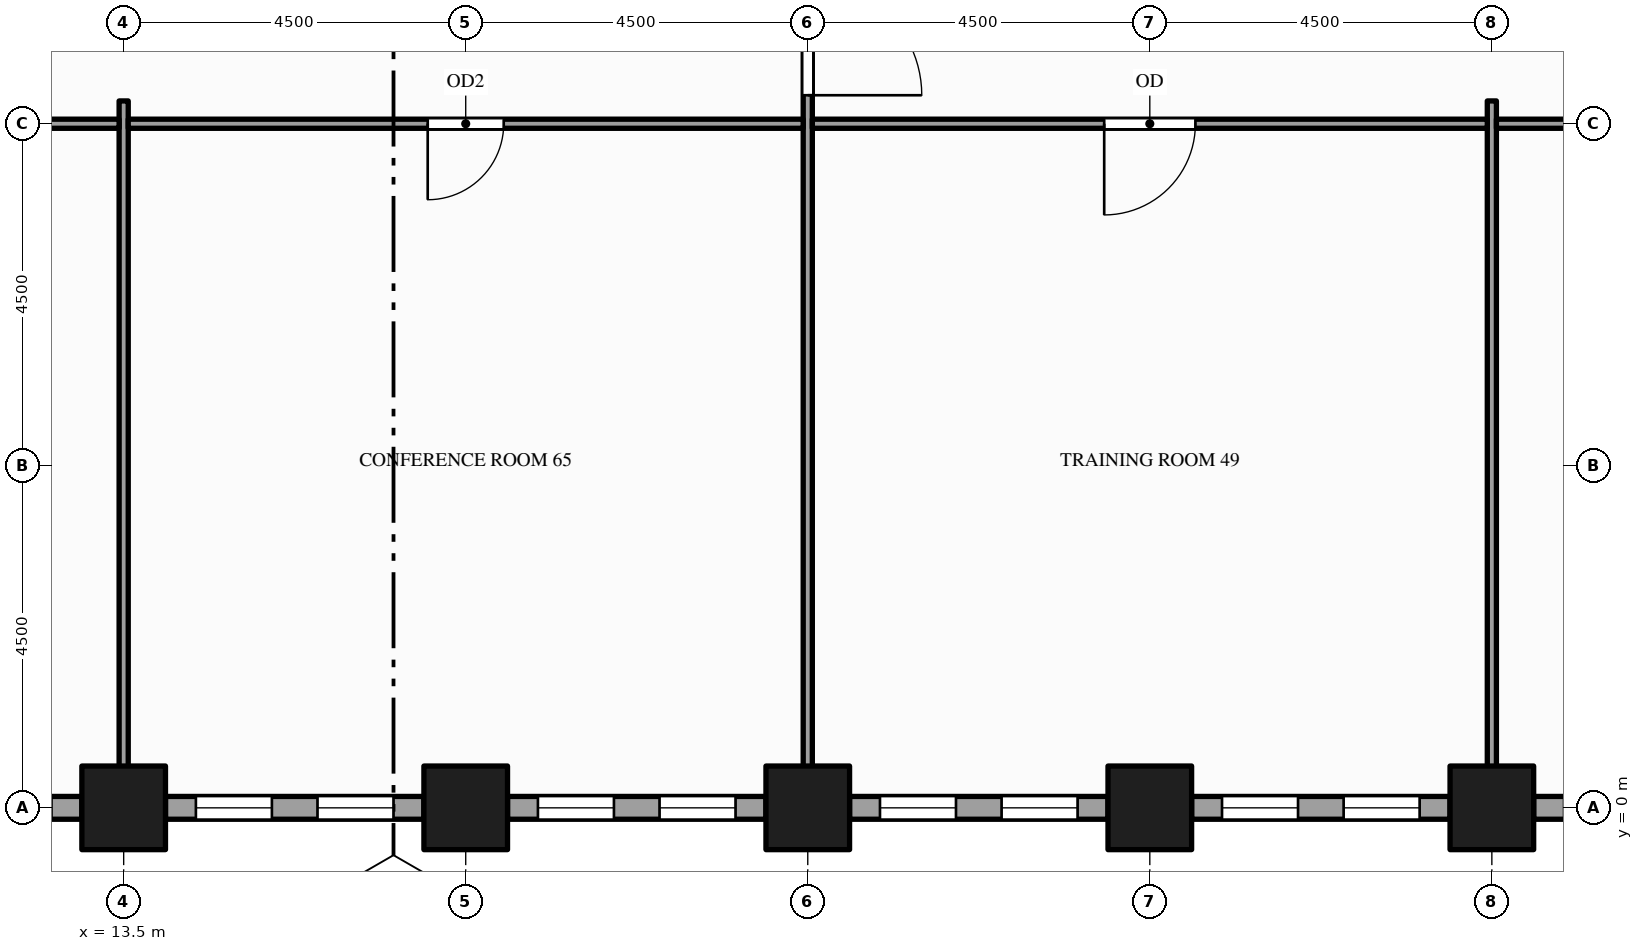
"""IFC4 building model, lengths in metres.
Left out: names, types, materials, properties, quantities, classifications, styles, units other than length and angle.
Written with IfcOpenShell. Run it as: python <this file> out.ifc"""

import sys

from ifc_helpers import new_model, si_unit, direction, frame, frame_2d, origin, origin_2d, place, context, subcontext, project, spatial, rectangle, hollow_rectangle, extrude, element, fill, save


model = new_model("IFC4")
c1 = context("Model", 3, precision=1e-05, world=origin(), true_north=direction((0.0, 1.0)))
c2 = subcontext(c1, "Body", "Model", "MODEL_VIEW")
j1 = project(units=[si_unit("LENGTHUNIT", "METRE"), si_unit("PLANEANGLEUNIT", "RADIAN")], contexts=[c1])
p1 = place(None, origin())
s1 = spatial("IfcSite", under=j1, at=p1, CompositionType="ELEMENT")
p2 = place(p1, origin())
s2 = spatial("IfcBuilding", under=s1, at=p2, CompositionType="ELEMENT")
p3 = place(p2, frame((0.0, 0.0, 24.0)))
s3 = spatial("IfcBuildingStorey", under=s2, at=p3, CompositionType="ELEMENT", Elevation=24.0)
for number, where, z_axis, x_axis in (
    (1, (13.5, 0.0, -0.25), (0.0, 0.0, 1.0), (1.0, 0.0, 0.0)),
    (2, (18.0, 0.0, -0.25), (0.0, 0.0, 1.0), (1.0, 0.0, 0.0)),
):
    element("IfcColumn", number, at=place(p3, frame(where, z_axis=z_axis, x_axis=x_axis)), inside=s3, PredefinedType="COLUMN", context=c2, shape_type="SweptSolid", body=[
        extrude(hollow_rectangle(XDim=1.1, YDim=1.1, WallThickness=0.06, at=origin_2d()), origin(), (0.0, 0.0, 1.0), 5.1),
    ])
for number, where, z_axis, x_axis in (
    (3, (22.5, 0.0, -0.25), (0.0, 0.0, 1.0), (1.0, 0.0, 0.0)),
    (4, (27.0, 0.0, -0.25), (0.0, 0.0, 1.0), (1.0, 0.0, 0.0)),
    (5, (31.5, 0.0, -0.25), (0.0, 0.0, 1.0), (1.0, 0.0, 0.0)),
):
    element("IfcColumn", number, at=place(p3, frame(where, z_axis=z_axis, x_axis=x_axis)), inside=s3, PredefinedType="COLUMN", context=c2, shape_type="SweptSolid", body=[
        extrude(hollow_rectangle(XDim=1.1, YDim=1.1, WallThickness=0.06, at=origin_2d()), origin(), (0.0, 0.0, 1.0), 4.95),
    ])
p4 = place(p3, frame((9.55, 0.0, 0.0), z_axis=(0.0, 0.0, 1.0), x_axis=(1.0, 0.0, 0.0)))
e6 = element("IfcWall", 6, at=p4, inside=s3, PredefinedType="STANDARD", context=c2, shape_type="SweptSolid", body=[
    extrude(rectangle(XDim=3.4, YDim=0.3, at=frame_2d((1.7, 0.0))), origin(), (0.0, 0.0, 1.0), 4.136),
])
p5 = place(p4, frame((0.4, 0.0, 0.9)))
e7 = element("IfcOpeningElement", 7, at=p5, cuts=e6, PredefinedType="OPENING", context=c2, shape_type="SweptSolid", body=[
    extrude(rectangle(XDim=1.0, YDim=3.0, at=frame_2d((0.5, 1.5))), frame((0.0, 0.16, 0.0), z_axis=(0.0, -1.0, 0.0), x_axis=(1.0, 0.0, 0.0)), (0.0, 0.0, 1.0), 0.32),
])
p6 = place(p4, frame((2.0, 0.0, 0.9)))
e8 = element("IfcOpeningElement", 8, at=p6, cuts=e6, PredefinedType="OPENING", context=c2, shape_type="SweptSolid", body=[
    extrude(rectangle(XDim=1.0, YDim=3.0, at=frame_2d((0.5, 1.5))), frame((0.0, 0.16, 0.0), z_axis=(0.0, -1.0, 0.0), x_axis=(1.0, 0.0, 0.0)), (0.0, 0.0, 1.0), 0.32),
])
p7 = place(p3, frame((14.05, 0.0, 0.0), z_axis=(0.0, 0.0, 1.0), x_axis=(1.0, 0.0, 0.0)))
e9 = element("IfcWall", 9, at=p7, inside=s3, PredefinedType="STANDARD", context=c2, shape_type="SweptSolid", body=[
    extrude(rectangle(XDim=3.4, YDim=0.3, at=frame_2d((1.7, 0.0))), origin(), (0.0, 0.0, 1.0), 4.136),
])
p8 = place(p7, frame((0.4, 0.0, 0.9)))
e10 = element("IfcOpeningElement", 10, at=p8, cuts=e9, PredefinedType="OPENING", context=c2, shape_type="SweptSolid", body=[
    extrude(rectangle(XDim=1.0, YDim=3.0, at=frame_2d((0.5, 1.5))), frame((0.0, 0.16, 0.0), z_axis=(0.0, -1.0, 0.0), x_axis=(1.0, 0.0, 0.0)), (0.0, 0.0, 1.0), 0.32),
])
p9 = place(p7, frame((2.0, 0.0, 0.9)))
e11 = element("IfcOpeningElement", 11, at=p9, cuts=e9, PredefinedType="OPENING", context=c2, shape_type="SweptSolid", body=[
    extrude(rectangle(XDim=1.0, YDim=3.0, at=frame_2d((0.5, 1.5))), frame((0.0, 0.16, 0.0), z_axis=(0.0, -1.0, 0.0), x_axis=(1.0, 0.0, 0.0)), (0.0, 0.0, 1.0), 0.32),
])
p10 = place(p3, frame((18.55, 0.0, 0.0), z_axis=(0.0, 0.0, 1.0), x_axis=(1.0, 0.0, 0.0)))
e12 = element("IfcWall", 12, at=p10, inside=s3, PredefinedType="STANDARD", context=c2, shape_type="SweptSolid", body=[
    extrude(rectangle(XDim=3.4, YDim=0.3, at=frame_2d((1.7, 0.0))), origin(), (0.0, 0.0, 1.0), 4.136),
])
p11 = place(p10, frame((0.4, 0.0, 0.9)))
e13 = element("IfcOpeningElement", 13, at=p11, cuts=e12, PredefinedType="OPENING", context=c2, shape_type="SweptSolid", body=[
    extrude(rectangle(XDim=1.0, YDim=3.0, at=frame_2d((0.5, 1.5))), frame((0.0, 0.16, 0.0), z_axis=(0.0, -1.0, 0.0), x_axis=(1.0, 0.0, 0.0)), (0.0, 0.0, 1.0), 0.32),
])
p12 = place(p10, frame((2.0, 0.0, 0.9)))
e14 = element("IfcOpeningElement", 14, at=p12, cuts=e12, PredefinedType="OPENING", context=c2, shape_type="SweptSolid", body=[
    extrude(rectangle(XDim=1.0, YDim=3.0, at=frame_2d((0.5, 1.5))), frame((0.0, 0.16, 0.0), z_axis=(0.0, -1.0, 0.0), x_axis=(1.0, 0.0, 0.0)), (0.0, 0.0, 1.0), 0.32),
])
p13 = place(p3, frame((23.05, 0.0, 0.0), z_axis=(0.0, 0.0, 1.0), x_axis=(1.0, 0.0, 0.0)))
e15 = element("IfcWall", 15, at=p13, inside=s3, PredefinedType="STANDARD", context=c2, shape_type="SweptSolid", body=[
    extrude(rectangle(XDim=3.4, YDim=0.3, at=frame_2d((1.7, 0.0))), origin(), (0.0, 0.0, 1.0), 3.994),
])
p14 = place(p13, frame((0.4, 0.0, 0.9)))
e16 = element("IfcOpeningElement", 16, at=p14, cuts=e15, PredefinedType="OPENING", context=c2, shape_type="SweptSolid", body=[
    extrude(rectangle(XDim=1.0, YDim=2.75, at=frame_2d((0.5, 1.375))), frame((0.0, 0.16, 0.0), z_axis=(0.0, -1.0, 0.0), x_axis=(1.0, 0.0, 0.0)), (0.0, 0.0, 1.0), 0.32),
])
p15 = place(p13, frame((2.0, 0.0, 0.9)))
e17 = element("IfcOpeningElement", 17, at=p15, cuts=e15, PredefinedType="OPENING", context=c2, shape_type="SweptSolid", body=[
    extrude(rectangle(XDim=1.0, YDim=2.75, at=frame_2d((0.5, 1.375))), frame((0.0, 0.16, 0.0), z_axis=(0.0, -1.0, 0.0), x_axis=(1.0, 0.0, 0.0)), (0.0, 0.0, 1.0), 0.32),
])
p16 = place(p3, frame((27.55, 0.0, 0.0), z_axis=(0.0, 0.0, 1.0), x_axis=(1.0, 0.0, 0.0)))
e18 = element("IfcWall", 18, at=p16, inside=s3, PredefinedType="STANDARD", context=c2, shape_type="SweptSolid", body=[
    extrude(rectangle(XDim=3.4, YDim=0.3, at=frame_2d((1.7, 0.0))), origin(), (0.0, 0.0, 1.0), 3.994),
])
p17 = place(p16, frame((0.4, 0.0, 0.9)))
e19 = element("IfcOpeningElement", 19, at=p17, cuts=e18, PredefinedType="OPENING", context=c2, shape_type="SweptSolid", body=[
    extrude(rectangle(XDim=1.0, YDim=2.75, at=frame_2d((0.5, 1.375))), frame((0.0, 0.16, 0.0), z_axis=(0.0, -1.0, 0.0), x_axis=(1.0, 0.0, 0.0)), (0.0, 0.0, 1.0), 0.32),
])
p18 = place(p16, frame((2.0, 0.0, 0.9)))
e20 = element("IfcOpeningElement", 20, at=p18, cuts=e18, PredefinedType="OPENING", context=c2, shape_type="SweptSolid", body=[
    extrude(rectangle(XDim=1.0, YDim=2.75, at=frame_2d((0.5, 1.375))), frame((0.0, 0.16, 0.0), z_axis=(0.0, -1.0, 0.0), x_axis=(1.0, 0.0, 0.0)), (0.0, 0.0, 1.0), 0.32),
])
p19 = place(p3, frame((32.05, 0.0, 0.0), z_axis=(0.0, 0.0, 1.0), x_axis=(1.0, 0.0, 0.0)))
e21 = element("IfcWall", 21, at=p19, inside=s3, PredefinedType="STANDARD", context=c2, shape_type="SweptSolid", body=[
    extrude(rectangle(XDim=3.4, YDim=0.3, at=frame_2d((1.7, 0.0))), origin(), (0.0, 0.0, 1.0), 3.994),
])
p20 = place(p19, frame((0.4, 0.0, 0.9)))
e22 = element("IfcOpeningElement", 22, at=p20, cuts=e21, PredefinedType="OPENING", context=c2, shape_type="SweptSolid", body=[
    extrude(rectangle(XDim=1.0, YDim=2.75, at=frame_2d((0.5, 1.375))), frame((0.0, 0.16, 0.0), z_axis=(0.0, -1.0, 0.0), x_axis=(1.0, 0.0, 0.0)), (0.0, 0.0, 1.0), 0.32),
])
p21 = place(p19, frame((2.0, 0.0, 0.9)))
e23 = element("IfcOpeningElement", 23, at=p21, cuts=e21, PredefinedType="OPENING", context=c2, shape_type="SweptSolid", body=[
    extrude(rectangle(XDim=1.0, YDim=2.75, at=frame_2d((0.5, 1.375))), frame((0.0, 0.16, 0.0), z_axis=(0.0, -1.0, 0.0), x_axis=(1.0, 0.0, 0.0)), (0.0, 0.0, 1.0), 0.32),
])
p22 = place(p3, frame((13.5, 0.15, 0.0), z_axis=(0.0, 0.0, 1.0), x_axis=(0.0, 1.0, 0.0)))
e24 = element("IfcWall", 24, at=p22, inside=s3, PredefinedType="PARTITIONING", context=c2, shape_type="SweptSolid", body=[
    extrude(rectangle(XDim=9.15, YDim=0.12, at=frame_2d((4.575, 0.0))), origin(), (0.0, 0.0, 1.0), 3.938),
])
p23 = place(p3, frame((22.5, 0.15, 0.0), z_axis=(0.0, 0.0, 1.0), x_axis=(0.0, 1.0, 0.0)))
e25 = element("IfcWall", 25, at=p23, inside=s3, PredefinedType="PARTITIONING", context=c2, shape_type="SweptSolid", body=[
    extrude(rectangle(XDim=35.95, YDim=0.12, at=frame_2d((17.975, 0.0))), origin(), (0.0, 0.0, 1.0), 3.3),
])
p24 = place(p23, frame((9.225, 0.0, 0.0)))
e26 = element("IfcOpeningElement", 26, at=p24, cuts=e25, PredefinedType="OPENING", context=c2, shape_type="SweptSolid", body=[
    extrude(rectangle(XDim=1.5, YDim=2.1, at=frame_2d((0.75, 1.05))), frame((0.0, 0.07, 0.0), z_axis=(0.0, -1.0, 0.0), x_axis=(1.0, 0.0, 0.0)), (0.0, 0.0, 1.0), 0.14),
])
p25 = place(p23, frame((32.7, 0.0, 0.0)))
e27 = element("IfcOpeningElement", 27, at=p25, cuts=e25, PredefinedType="OPENING", context=c2, shape_type="SweptSolid", body=[
    extrude(rectangle(XDim=1.8, YDim=2.1, at=frame_2d((0.9, 1.05))), frame((0.0, 0.07, 0.0), z_axis=(0.0, -1.0, 0.0), x_axis=(1.0, 0.0, 0.0)), (0.0, 0.0, 1.0), 0.14),
])
p26 = place(p3, frame((31.5, 0.15, 0.0), z_axis=(0.0, 0.0, 1.0), x_axis=(0.0, 1.0, 0.0)))
e28 = element("IfcWall", 28, at=p26, inside=s3, PredefinedType="PARTITIONING", context=c2, shape_type="SweptSolid", body=[
    extrude(rectangle(XDim=9.15, YDim=0.12, at=frame_2d((4.575, 0.0))), origin(), (0.0, 0.0, 1.0), 3.3),
])
p27 = place(p3, frame((9.06, 9.0, 0.0), z_axis=(0.0, 0.0, 1.0), x_axis=(1.0, 0.0, 0.0)))
e29 = element("IfcWall", 29, at=p27, inside=s3, PredefinedType="PARTITIONING", context=c2, shape_type="SweptSolid", body=[
    extrude(rectangle(XDim=4.38, YDim=0.12, at=frame_2d((2.19, 0.0))), origin(), (0.0, 0.0, 1.0), 3.938),
])
p28 = place(p27, frame((1.69, 0.0, 0.0)))
e30 = element("IfcOpeningElement", 30, at=p28, cuts=e29, PredefinedType="OPENING", context=c2, shape_type="SweptSolid", body=[
    extrude(rectangle(XDim=1.0, YDim=2.1, at=frame_2d((0.5, 1.05))), frame((0.0, 0.07, 0.0), z_axis=(0.0, -1.0, 0.0), x_axis=(1.0, 0.0, 0.0)), (0.0, 0.0, 1.0), 0.14),
])
p29 = place(p3, frame((13.56, 9.0, 0.0), z_axis=(0.0, 0.0, 1.0), x_axis=(1.0, 0.0, 0.0)))
e31 = element("IfcWall", 31, at=p29, inside=s3, PredefinedType="PARTITIONING", context=c2, shape_type="SweptSolid", body=[
    extrude(rectangle(XDim=8.88, YDim=0.12, at=frame_2d((4.44, 0.0))), origin(), (0.0, 0.0, 1.0), 3.938),
])
p30 = place(p29, frame((3.94, 0.0, 0.0)))
e32 = element("IfcOpeningElement", 32, at=p30, cuts=e31, PredefinedType="OPENING", context=c2, shape_type="SweptSolid", body=[
    extrude(rectangle(XDim=1.0, YDim=2.1, at=frame_2d((0.5, 1.05))), frame((0.0, 0.07, 0.0), z_axis=(0.0, -1.0, 0.0), x_axis=(1.0, 0.0, 0.0)), (0.0, 0.0, 1.0), 0.14),
])
p31 = place(p3, frame((22.56, 9.0, 0.0), z_axis=(0.0, 0.0, 1.0), x_axis=(1.0, 0.0, 0.0)))
e33 = element("IfcWall", 33, at=p31, inside=s3, PredefinedType="PARTITIONING", context=c2, shape_type="SweptSolid", body=[
    extrude(rectangle(XDim=8.88, YDim=0.12, at=frame_2d((4.44, 0.0))), origin(), (0.0, 0.0, 1.0), 3.788),
])
p32 = place(p31, frame((3.84, 0.0, 0.0)))
e34 = element("IfcOpeningElement", 34, at=p32, cuts=e33, PredefinedType="OPENING", context=c2, shape_type="SweptSolid", body=[
    extrude(rectangle(XDim=1.2, YDim=2.1, at=frame_2d((0.6, 1.05))), frame((0.0, 0.07, 0.0), z_axis=(0.0, -1.0, 0.0), x_axis=(1.0, 0.0, 0.0)), (0.0, 0.0, 1.0), 0.14),
])
p33 = place(p3, frame((31.56, 9.0, 0.0), z_axis=(0.0, 0.0, 1.0), x_axis=(1.0, 0.0, 0.0)))
e35 = element("IfcWall", 35, at=p33, inside=s3, PredefinedType="PARTITIONING", context=c2, shape_type="SweptSolid", body=[
    extrude(rectangle(XDim=13.38, YDim=0.12, at=frame_2d((6.69, 0.0))), origin(), (0.0, 0.0, 1.0), 3.938),
])
p34 = place(p33, frame((6.09, 0.0, 0.0)))
e36 = element("IfcOpeningElement", 36, at=p34, cuts=e35, PredefinedType="OPENING", context=c2, shape_type="SweptSolid", body=[
    extrude(rectangle(XDim=1.2, YDim=2.1, at=frame_2d((0.6, 1.05))), frame((0.0, 0.07, 0.0), z_axis=(0.0, -1.0, 0.0), x_axis=(1.0, 0.0, 0.0)), (0.0, 0.0, 1.0), 0.14),
])
p35 = place(p8, origin())
e37 = element("IfcWindow", 37, at=p35, inside=s3, PartitioningType="SINGLE_PANEL", PredefinedType="WINDOW", context=c2, shape_type="SweptSolid", body=[
    extrude(rectangle(XDim=1.0, YDim=3.0, at=frame_2d((0.5, 1.5))), frame((0.0, 0.03, 0.0), z_axis=(0.0, -1.0, 0.0), x_axis=(1.0, 0.0, 0.0)), (0.0, 0.0, 1.0), 0.06),
])
fill(e10, e37)
p36 = place(p9, origin())
e38 = element("IfcWindow", 38, at=p36, inside=s3, PartitioningType="SINGLE_PANEL", PredefinedType="WINDOW", context=c2, shape_type="SweptSolid", body=[
    extrude(rectangle(XDim=1.0, YDim=3.0, at=frame_2d((0.5, 1.5))), frame((0.0, 0.03, 0.0), z_axis=(0.0, -1.0, 0.0), x_axis=(1.0, 0.0, 0.0)), (0.0, 0.0, 1.0), 0.06),
])
fill(e11, e38)
p37 = place(p11, origin())
e39 = element("IfcWindow", 39, at=p37, inside=s3, PartitioningType="SINGLE_PANEL", PredefinedType="WINDOW", context=c2, shape_type="SweptSolid", body=[
    extrude(rectangle(XDim=1.0, YDim=3.0, at=frame_2d((0.5, 1.5))), frame((0.0, 0.03, 0.0), z_axis=(0.0, -1.0, 0.0), x_axis=(1.0, 0.0, 0.0)), (0.0, 0.0, 1.0), 0.06),
])
fill(e13, e39)
p38 = place(p12, origin())
e40 = element("IfcWindow", 40, at=p38, inside=s3, PartitioningType="SINGLE_PANEL", PredefinedType="WINDOW", context=c2, shape_type="SweptSolid", body=[
    extrude(rectangle(XDim=1.0, YDim=3.0, at=frame_2d((0.5, 1.5))), frame((0.0, 0.03, 0.0), z_axis=(0.0, -1.0, 0.0), x_axis=(1.0, 0.0, 0.0)), (0.0, 0.0, 1.0), 0.06),
])
fill(e14, e40)
p39 = place(p14, origin())
e41 = element("IfcWindow", 41, at=p39, inside=s3, PartitioningType="SINGLE_PANEL", PredefinedType="WINDOW", context=c2, shape_type="SweptSolid", body=[
    extrude(rectangle(XDim=1.0, YDim=2.75, at=frame_2d((0.5, 1.375))), frame((0.0, 0.03, 0.0), z_axis=(0.0, -1.0, 0.0), x_axis=(1.0, 0.0, 0.0)), (0.0, 0.0, 1.0), 0.06),
])
fill(e16, e41)
p40 = place(p15, origin())
e42 = element("IfcWindow", 42, at=p40, inside=s3, PartitioningType="SINGLE_PANEL", PredefinedType="WINDOW", context=c2, shape_type="SweptSolid", body=[
    extrude(rectangle(XDim=1.0, YDim=2.75, at=frame_2d((0.5, 1.375))), frame((0.0, 0.03, 0.0), z_axis=(0.0, -1.0, 0.0), x_axis=(1.0, 0.0, 0.0)), (0.0, 0.0, 1.0), 0.06),
])
fill(e17, e42)
p41 = place(p17, origin())
e43 = element("IfcWindow", 43, at=p41, inside=s3, PartitioningType="SINGLE_PANEL", PredefinedType="WINDOW", context=c2, shape_type="SweptSolid", body=[
    extrude(rectangle(XDim=1.0, YDim=2.75, at=frame_2d((0.5, 1.375))), frame((0.0, 0.03, 0.0), z_axis=(0.0, -1.0, 0.0), x_axis=(1.0, 0.0, 0.0)), (0.0, 0.0, 1.0), 0.06),
])
fill(e19, e43)
p42 = place(p18, origin())
e44 = element("IfcWindow", 44, at=p42, inside=s3, PartitioningType="SINGLE_PANEL", PredefinedType="WINDOW", context=c2, shape_type="SweptSolid", body=[
    extrude(rectangle(XDim=1.0, YDim=2.75, at=frame_2d((0.5, 1.375))), frame((0.0, 0.03, 0.0), z_axis=(0.0, -1.0, 0.0), x_axis=(1.0, 0.0, 0.0)), (0.0, 0.0, 1.0), 0.06),
])
fill(e20, e44)
p43 = place(p32, origin())
e45 = element("IfcDoor", 45, at=p43, inside=s3, OperationType="SINGLE_SWING_LEFT", PredefinedType="DOOR", context=c2, shape_type="SweptSolid", body=[
    extrude(rectangle(XDim=1.2, YDim=2.1, at=frame_2d((0.6, 1.05))), frame((0.0, 0.025, 0.0), z_axis=(0.0, -1.0, 0.0), x_axis=(1.0, 0.0, 0.0)), (0.0, 0.0, 1.0), 0.05),
])
fill(e34, e45)
p44 = place(p24, origin())
e46 = element("IfcDoor", 46, at=p44, inside=s3, OperationType="SINGLE_SWING_LEFT", PredefinedType="DOOR", context=c2, shape_type="SweptSolid", body=[
    extrude(rectangle(XDim=1.5, YDim=2.1, at=frame_2d((0.75, 1.05))), frame((0.0, 0.025, 0.0), z_axis=(0.0, -1.0, 0.0), x_axis=(1.0, 0.0, 0.0)), (0.0, 0.0, 1.0), 0.05),
])
fill(e26, e46)
p45 = place(p30, origin())
e47 = element("IfcDoor", 47, at=p45, inside=s3, OperationType="SINGLE_SWING_LEFT", PredefinedType="DOOR", context=c2, shape_type="SweptSolid", body=[
    extrude(rectangle(XDim=1.0, YDim=2.1, at=frame_2d((0.5, 1.05))), frame((0.0, 0.025, 0.0), z_axis=(0.0, -1.0, 0.0), x_axis=(1.0, 0.0, 0.0)), (0.0, 0.0, 1.0), 0.05),
])
fill(e32, e47)
save(model, sys.argv[1])
